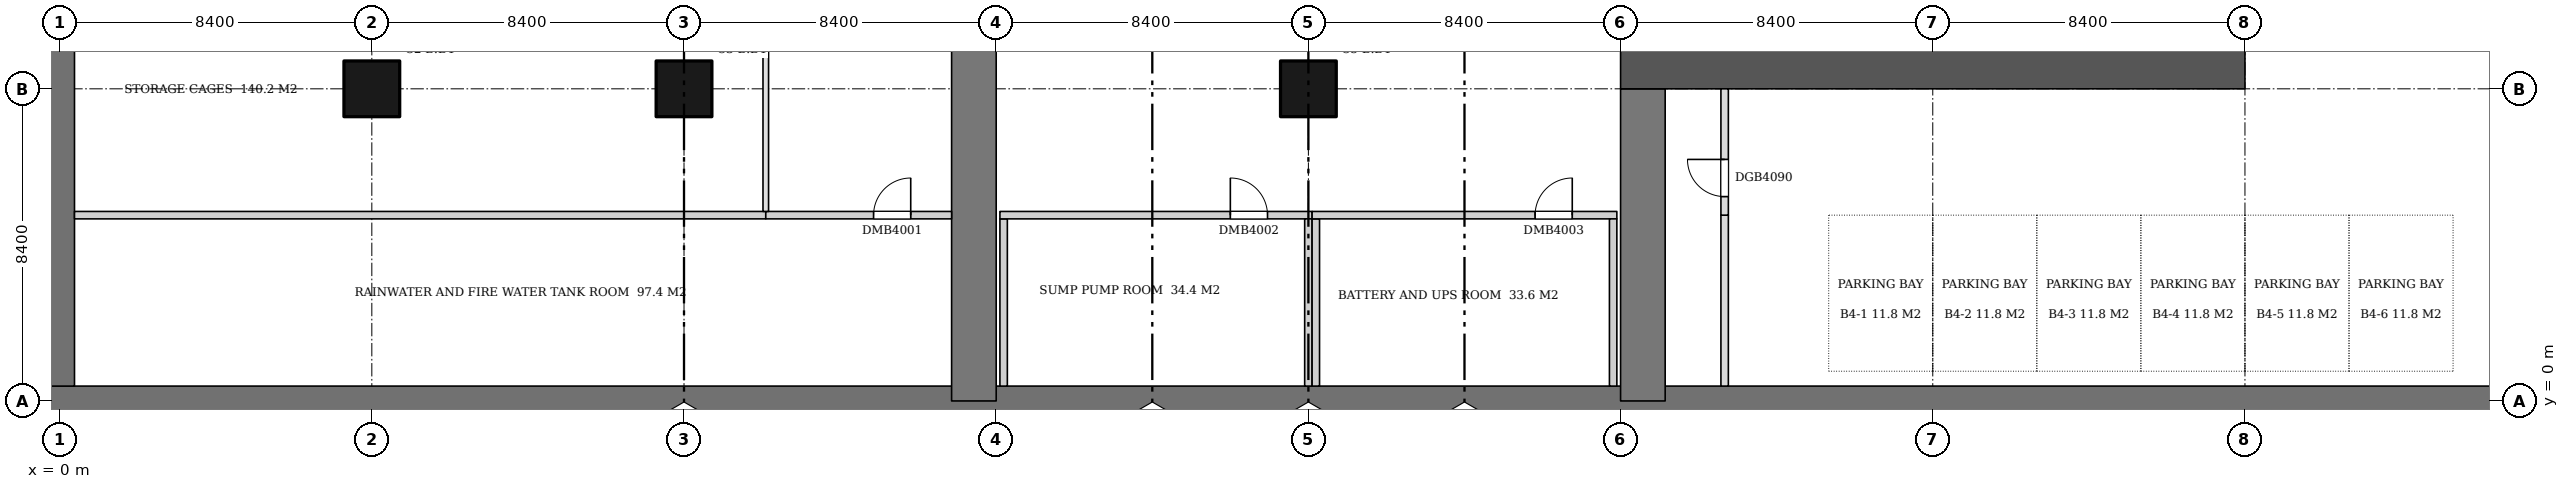
"""IFC4 building model, lengths in metres.
Left out: names, types, materials, properties, quantities, classifications, styles, units other than length and angle.
Written with IfcOpenShell. Run it as: python <this file> out.ifc"""

import sys

from ifc_helpers import new_model, si_unit, direction, frame, frame_2d, origin, origin_2d, place, context, subcontext, project, spatial, rectangle, extrude, element, fill, save


model = new_model("IFC4")
c1 = context("Model", 3, precision=1e-05, world=origin(), true_north=direction((0.0, 1.0)))
c2 = subcontext(c1, "Body", "Model", "MODEL_VIEW")
j1 = project(units=[si_unit("LENGTHUNIT", "METRE"), si_unit("PLANEANGLEUNIT", "RADIAN")], contexts=[c1])
p1 = place(None, origin())
s1 = spatial("IfcSite", under=j1, at=p1, CompositionType="ELEMENT")
p2 = place(p1, origin())
s2 = spatial("IfcBuilding", under=s1, at=p2, CompositionType="ELEMENT")
p3 = place(p2, frame((0.0, 0.0, -16.0)))
s3 = spatial("IfcBuildingStorey", under=s2, at=p3, CompositionType="ELEMENT", Elevation=-16.0)
p4 = place(p3, frame((-0.4, 0.0, 0.0), z_axis=(0.0, 0.0, 1.0), x_axis=(1.0, 0.0, 0.0)))
e1 = element("IfcWall", 1, at=p4, inside=s3, PredefinedType="SOLIDWALL", context=c2, shape_type="SweptSolid", body=[
    extrude(rectangle(XDim=67.6, YDim=0.8, at=frame_2d((33.8, 0.0))), origin(), (0.0, 0.0, 1.0), 3.7),
])
p5 = place(p3, frame((0.0, 0.4, 0.0), z_axis=(0.0, 0.0, 1.0), x_axis=(0.0, 1.0, 0.0)))
e2 = element("IfcWall", 2, at=p5, inside=s3, PredefinedType="SOLIDWALL", context=c2, shape_type="SweptSolid", body=[
    extrude(rectangle(XDim=58.0, YDim=0.8, at=frame_2d((29.0, 0.0))), origin(), (0.0, 0.0, 1.0), 3.7),
])
p6 = place(p3, frame((24.6, 0.0, 0.0), z_axis=(0.0, 0.0, 1.0), x_axis=(0.0, 1.0, 0.0)))
e3 = element("IfcWall", 3, at=p6, inside=s3, PredefinedType="SHEAR", context=c2, shape_type="SweptSolid", body=[
    extrude(rectangle(XDim=25.2, YDim=1.2, at=frame_2d((12.6, 0.0))), origin(), (0.0, 0.0, 1.0), 3.7),
])
p7 = place(p3, frame((42.6, 0.0, 0.0), z_axis=(0.0, 0.0, 1.0), x_axis=(0.0, 1.0, 0.0)))
e4 = element("IfcWall", 4, at=p7, inside=s3, PredefinedType="SHEAR", context=c2, shape_type="SweptSolid", body=[
    extrude(rectangle(XDim=8.4, YDim=1.2, at=frame_2d((4.2, 0.0))), origin(), (0.0, 0.0, 1.0), 3.7),
])
for number, where, z_axis, x_axis in (
    (5, (8.4, 8.4, 0.0), (0.0, 0.0, 1.0), (1.0, 0.0, 0.0)),
    (6, (16.8, 8.4, 0.0), (0.0, 0.0, 1.0), (1.0, 0.0, 0.0)),
    (7, (33.6, 8.4, 0.0), (0.0, 0.0, 1.0), (1.0, 0.0, 0.0)),
):
    element("IfcColumn", number, at=place(p3, frame(where, z_axis=z_axis, x_axis=x_axis)), inside=s3, PredefinedType="COLUMN", context=c2, shape_type="SweptSolid", body=[
        extrude(rectangle(XDim=1.5, YDim=1.5, at=origin_2d()), origin(), (0.0, 0.0, 1.0), 3.7),
    ])
p8 = place(p3, frame((42.0, 9.0, 0.0), z_axis=(0.0, 0.0, 1.0), x_axis=(1.0, 0.0, 0.0)))
e8 = element("IfcWall", 8, at=p8, inside=s3, PredefinedType="SHEAR", context=c2, shape_type="SweptSolid", body=[
    extrude(rectangle(XDim=16.8, YDim=1.2, at=frame_2d((8.4, 0.0))), origin(), (0.0, 0.0, 1.0), 3.7),
])
p9 = place(p3, frame((0.4, 5.0, 0.0), z_axis=(0.0, 0.0, 1.0), x_axis=(1.0, 0.0, 0.0)))
e9 = element("IfcWall", 9, at=p9, inside=s3, PredefinedType="PARTITIONING", context=c2, shape_type="SweptSolid", body=[
    extrude(rectangle(XDim=18.6, YDim=0.2, at=frame_2d((9.3, 0.0))), origin(), (0.0, 0.0, 1.0), 3.7),
])
p10 = place(p3, frame((19.0, 5.1, 0.0), z_axis=(0.0, 0.0, 1.0), x_axis=(0.0, 1.0, 0.0)))
e10 = element("IfcWall", 10, at=p10, inside=s3, PredefinedType="PARTITIONING", context=c2, shape_type="SweptSolid", body=[
    extrude(rectangle(XDim=6.625, YDim=0.15, at=frame_2d((3.312, 0.0))), origin(), (0.0, 0.0, 1.0), 3.7),
])
p11 = place(p3, frame((19.0, 5.0, 0.0), z_axis=(0.0, 0.0, 1.0), x_axis=(1.0, 0.0, 0.0)))
e11 = element("IfcWall", 11, at=p11, inside=s3, PredefinedType="PARTITIONING", context=c2, shape_type="SweptSolid", body=[
    extrude(rectangle(XDim=5.0, YDim=0.2, at=frame_2d((2.5, 0.0))), origin(), (0.0, 0.0, 1.0), 3.7),
])
p12 = place(p11, frame((2.9, 0.0, 0.0)))
e12 = element("IfcOpeningElement", 12, at=p12, cuts=e11, PredefinedType="OPENING", context=c2, shape_type="SweptSolid", body=[
    extrude(rectangle(XDim=1.0, YDim=2.1, at=frame_2d((0.5, 1.05))), frame((0.0, 0.11, 0.0), z_axis=(0.0, -1.0, 0.0), x_axis=(1.0, 0.0, 0.0)), (0.0, 0.0, 1.0), 0.22),
])
p13 = place(p3, frame((25.4, 0.4, 0.0), z_axis=(0.0, 0.0, 1.0), x_axis=(0.0, 1.0, 0.0)))
e13 = element("IfcWall", 13, at=p13, inside=s3, PredefinedType="PARTITIONING", context=c2, shape_type="SweptSolid", body=[
    extrude(rectangle(XDim=4.5, YDim=0.2, at=frame_2d((2.25, 0.0))), origin(), (0.0, 0.0, 1.0), 3.7),
])
p14 = place(p3, frame((25.3, 5.0, 0.0), z_axis=(0.0, 0.0, 1.0), x_axis=(1.0, 0.0, 0.0)))
e14 = element("IfcWall", 14, at=p14, inside=s3, PredefinedType="PARTITIONING", context=c2, shape_type="SweptSolid", body=[
    extrude(rectangle(XDim=8.4, YDim=0.2, at=frame_2d((4.2, 0.0))), origin(), (0.0, 0.0, 1.0), 3.7),
])
p15 = place(p14, frame((6.2, 0.0, 0.0)))
e15 = element("IfcOpeningElement", 15, at=p15, cuts=e14, PredefinedType="OPENING", context=c2, shape_type="SweptSolid", body=[
    extrude(rectangle(XDim=1.0, YDim=2.1, at=frame_2d((0.5, 1.05))), frame((0.0, 0.11, 0.0), z_axis=(0.0, -1.0, 0.0), x_axis=(1.0, 0.0, 0.0)), (0.0, 0.0, 1.0), 0.22),
])
for number, where, z_axis, x_axis in (
    (16, (33.6, 0.4, 0.0), (0.0, 0.0, 1.0), (0.0, 1.0, 0.0)),
    (17, (33.8, 0.4, 0.0), (0.0, 0.0, 1.0), (0.0, 1.0, 0.0)),
):
    element("IfcWall", number, at=place(p3, frame(where, z_axis=z_axis, x_axis=x_axis)), inside=s3, PredefinedType="PARTITIONING", context=c2, shape_type="SweptSolid", body=[
        extrude(rectangle(XDim=4.5, YDim=0.2, at=frame_2d((2.25, 0.0))), origin(), (0.0, 0.0, 1.0), 3.7),
    ])
p16 = place(p3, frame((33.7, 5.0, 0.0), z_axis=(0.0, 0.0, 1.0), x_axis=(1.0, 0.0, 0.0)))
e18 = element("IfcWall", 18, at=p16, inside=s3, PredefinedType="PARTITIONING", context=c2, shape_type="SweptSolid", body=[
    extrude(rectangle(XDim=8.2, YDim=0.2, at=frame_2d((4.1, 0.0))), origin(), (0.0, 0.0, 1.0), 3.7),
])
p17 = place(p16, frame((6.0, 0.0, 0.0)))
e19 = element("IfcOpeningElement", 19, at=p17, cuts=e18, PredefinedType="OPENING", context=c2, shape_type="SweptSolid", body=[
    extrude(rectangle(XDim=1.0, YDim=2.1, at=frame_2d((0.5, 1.05))), frame((0.0, 0.11, 0.0), z_axis=(0.0, -1.0, 0.0), x_axis=(1.0, 0.0, 0.0)), (0.0, 0.0, 1.0), 0.22),
])
p18 = place(p3, frame((41.8, 0.4, 0.0), z_axis=(0.0, 0.0, 1.0), x_axis=(0.0, 1.0, 0.0)))
e20 = element("IfcWall", 20, at=p18, inside=s3, PredefinedType="PARTITIONING", context=c2, shape_type="SweptSolid", body=[
    extrude(rectangle(XDim=4.5, YDim=0.2, at=frame_2d((2.25, 0.0))), origin(), (0.0, 0.0, 1.0), 3.7),
])
p19 = place(p3, frame((44.8, 0.4, 0.0), z_axis=(0.0, 0.0, 1.0), x_axis=(0.0, 1.0, 0.0)))
e21 = element("IfcWall", 21, at=p19, inside=s3, PredefinedType="PARTITIONING", context=c2, shape_type="SweptSolid", body=[
    extrude(rectangle(XDim=4.6, YDim=0.2, at=frame_2d((2.3, 0.0))), origin(), (0.0, 0.0, 1.0), 3.7),
])
p20 = place(p3, frame((44.8, 5.0, 0.0), z_axis=(0.0, 0.0, 1.0), x_axis=(0.0, 1.0, 0.0)))
e22 = element("IfcWall", 22, at=p20, inside=s3, PredefinedType="PARTITIONING", context=c2, shape_type="SweptSolid", body=[
    extrude(rectangle(XDim=3.4, YDim=0.2, at=frame_2d((1.7, 0.0))), origin(), (0.0, 0.0, 1.0), 3.7),
])
p21 = place(p20, frame((0.5, 0.0, 0.0)))
e23 = element("IfcOpeningElement", 23, at=p21, cuts=e22, PredefinedType="OPENING", context=c2, shape_type="SweptSolid", body=[
    extrude(rectangle(XDim=1.0, YDim=2.1, at=frame_2d((0.5, 1.05))), frame((0.0, 0.11, 0.0), z_axis=(0.0, -1.0, 0.0), x_axis=(1.0, 0.0, 0.0)), (0.0, 0.0, 1.0), 0.22),
])
p22 = place(p12, origin())
e24 = element("IfcDoor", 24, at=p22, inside=s3, OperationType="SINGLE_SWING_RIGHT", PredefinedType="DOOR", context=c2, shape_type="SweptSolid", body=[
    extrude(rectangle(XDim=1.0, YDim=2.1, at=frame_2d((0.5, 1.05))), frame((0.0, 0.025, 0.0), z_axis=(0.0, -1.0, 0.0), x_axis=(1.0, 0.0, 0.0)), (0.0, 0.0, 1.0), 0.05),
])
fill(e12, e24)
p23 = place(p15, origin())
e25 = element("IfcDoor", 25, at=p23, inside=s3, OperationType="SINGLE_SWING_LEFT", PredefinedType="DOOR", context=c2, shape_type="SweptSolid", body=[
    extrude(rectangle(XDim=1.0, YDim=2.1, at=frame_2d((0.5, 1.05))), frame((0.0, 0.025, 0.0), z_axis=(0.0, -1.0, 0.0), x_axis=(1.0, 0.0, 0.0)), (0.0, 0.0, 1.0), 0.05),
])
fill(e15, e25)
p24 = place(p17, origin())
e26 = element("IfcDoor", 26, at=p24, inside=s3, OperationType="SINGLE_SWING_RIGHT", PredefinedType="DOOR", context=c2, shape_type="SweptSolid", body=[
    extrude(rectangle(XDim=1.0, YDim=2.1, at=frame_2d((0.5, 1.05))), frame((0.0, 0.025, 0.0), z_axis=(0.0, -1.0, 0.0), x_axis=(1.0, 0.0, 0.0)), (0.0, 0.0, 1.0), 0.05),
])
fill(e19, e26)
p25 = place(p21, origin())
e27 = element("IfcDoor", 27, at=p25, inside=s3, OperationType="SINGLE_SWING_RIGHT", PredefinedType="DOOR", context=c2, shape_type="SweptSolid", body=[
    extrude(rectangle(XDim=1.0, YDim=2.1, at=frame_2d((0.5, 1.05))), frame((0.0, 0.025, 0.0), z_axis=(0.0, -1.0, 0.0), x_axis=(1.0, 0.0, 0.0)), (0.0, 0.0, 1.0), 0.05),
])
fill(e23, e27)
save(model, sys.argv[1])
